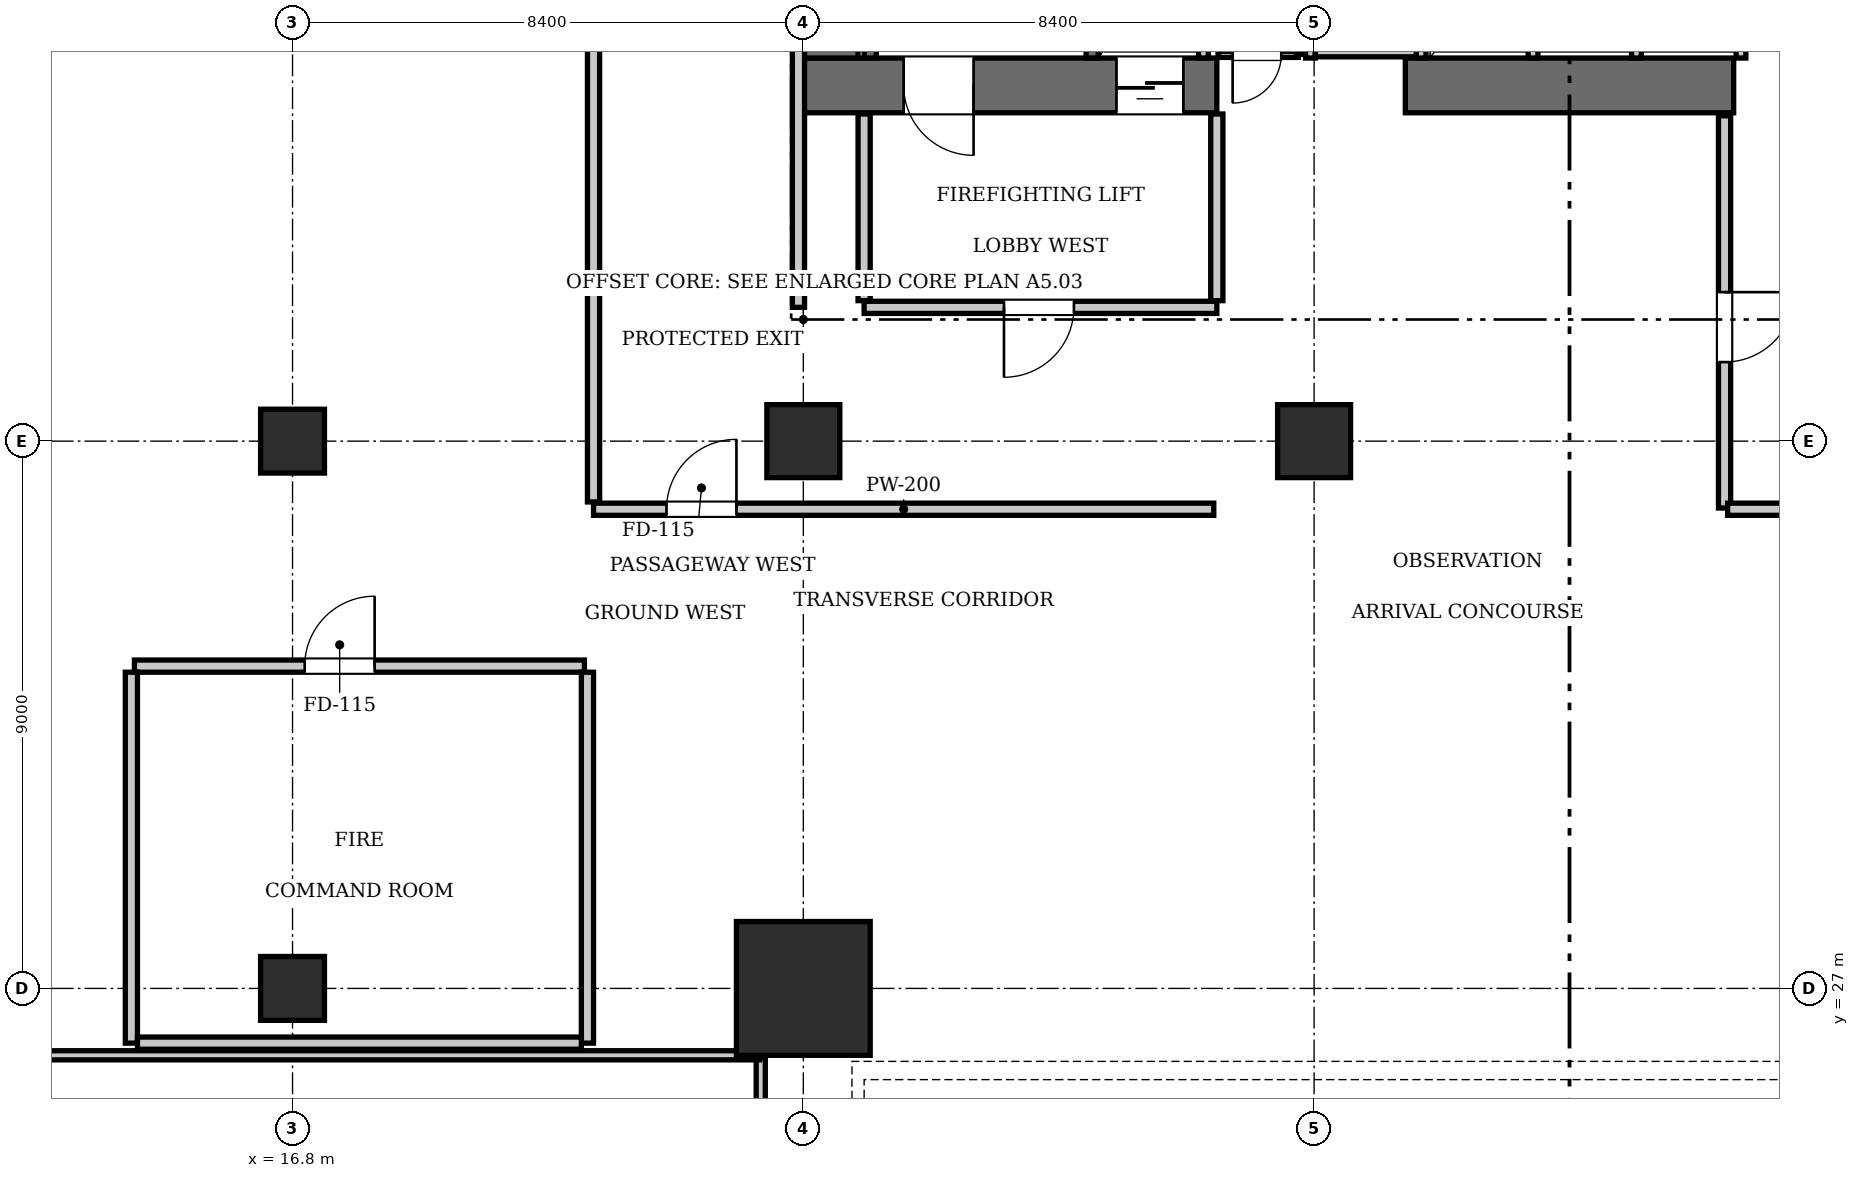
"""IFC4 building model, lengths in metres.
Left out: names, types, materials, properties, quantities, classifications, styles, units other than length and angle.
Written with IfcOpenShell. Run it as: python <this file> out.ifc"""

import sys

from ifc_helpers import new_model, si_unit, direction, frame, frame_2d, origin, origin_2d, place, context, subcontext, project, spatial, rectangle, extrude, element, fill, save


model = new_model("IFC4")
c1 = context("Model", 3, precision=1e-05, world=origin(), true_north=direction((0.0, 1.0)))
c2 = subcontext(c1, "Body", "Model", "MODEL_VIEW")
j1 = project(units=[si_unit("LENGTHUNIT", "METRE"), si_unit("PLANEANGLEUNIT", "RADIAN")], contexts=[c1])
p1 = place(None, origin())
s1 = spatial("IfcSite", under=j1, at=p1, CompositionType="ELEMENT")
p2 = place(p1, origin())
s2 = spatial("IfcBuilding", under=s1, at=p2, CompositionType="ELEMENT")
p3 = place(p2, origin())
s3 = spatial("IfcBuildingStorey", under=s2, at=p3, CompositionType="ELEMENT", Elevation=0.0)
p4 = place(p3, frame((25.2, 27.0, 0.0), z_axis=(0.0, 0.0, 1.0), x_axis=(1.0, 0.0, 0.0)))
e1 = element("IfcColumn", 1, at=p4, inside=s3, PredefinedType="COLUMN", context=c2, shape_type="SweptSolid", body=[
    extrude(rectangle(XDim=2.2, YDim=2.2, at=origin_2d()), origin(), (0.0, 0.0, 1.0), 5.6),
])
p5 = place(p3, frame((25.2, 41.85, 0.0), z_axis=(0.0, 0.0, 1.0), x_axis=(1.0, 0.0, 0.0)))
e2 = element("IfcWall", 2, at=p5, inside=s3, PredefinedType="SHEAR", context=c2, shape_type="SweptSolid", body=[
    extrude(rectangle(XDim=6.8, YDim=0.9, at=frame_2d((3.4, 0.0))), origin(), (0.0, 0.0, 1.0), 5.6),
])
p6 = place(p5, frame((1.65, 0.0, 0.0)))
e3 = element("IfcOpeningElement", 3, at=p6, cuts=e2, PredefinedType="OPENING", context=c2, shape_type="SweptSolid", body=[
    extrude(rectangle(XDim=1.15, YDim=2.15, at=frame_2d((0.575, 1.075))), frame((0.0, 0.46, 0.0), z_axis=(0.0, -1.0, 0.0), x_axis=(1.0, 0.0, 0.0)), (0.0, 0.0, 1.0), 0.92),
])
p7 = place(p5, frame((5.15, 0.0, 0.0)))
e4 = element("IfcOpeningElement", 4, at=p7, cuts=e2, PredefinedType="OPENING", context=c2, shape_type="SweptSolid", body=[
    extrude(rectangle(XDim=1.1, YDim=2.2, at=frame_2d((0.55, 1.1))), frame((0.0, 0.46, 0.0), z_axis=(0.0, -1.0, 0.0), x_axis=(1.0, 0.0, 0.0)), (0.0, 0.0, 1.0), 0.92),
])
p8 = place(p3, frame((35.1, 41.85, 0.0), z_axis=(0.0, 0.0, 1.0), x_axis=(1.0, 0.0, 0.0)))
e5 = element("IfcWall", 5, at=p8, inside=s3, PredefinedType="SHEAR", context=c2, shape_type="SweptSolid", body=[
    extrude(rectangle(XDim=5.4, YDim=0.9, at=frame_2d((2.7, 0.0))), origin(), (0.0, 0.0, 1.0), 5.6),
])
p9 = place(p3, frame((25.65, 42.3, 0.0), z_axis=(0.0, 0.0, 1.0), x_axis=(0.0, 1.0, 0.0)))
e6 = element("IfcWall", 6, at=p9, inside=s3, PredefinedType="SHEAR", context=c2, shape_type="SweptSolid", body=[
    extrude(rectangle(XDim=1.6, YDim=0.9, at=frame_2d((0.8, 0.0))), origin(), (0.0, 0.0, 1.0), 5.6),
])
for number, where, z_axis, x_axis in (
    (7, (25.2, 36.0, 0.0), (0.0, 0.0, 1.0), (1.0, 0.0, 0.0)),
    (8, (33.6, 36.0, 0.0), (0.0, 0.0, 1.0), (1.0, 0.0, 0.0)),
):
    element("IfcColumn", number, at=place(p3, frame(where, z_axis=z_axis, x_axis=x_axis)), inside=s3, PredefinedType="COLUMN", context=c2, shape_type="SweptSolid", body=[
        extrude(rectangle(XDim=1.2, YDim=1.2, at=origin_2d()), origin(), (0.0, 0.0, 1.0), 5.6),
    ])
for number, where, z_axis, x_axis in (
    (9, (16.8, 27.0, 0.0), (0.0, 0.0, 1.0), (1.0, 0.0, 0.0)),
    (10, (16.8, 36.0, 0.0), (0.0, 0.0, 1.0), (1.0, 0.0, 0.0)),
):
    element("IfcColumn", number, at=place(p3, frame(where, z_axis=z_axis, x_axis=x_axis)), inside=s3, PredefinedType="COLUMN", context=c2, shape_type="SweptSolid", body=[
        extrude(rectangle(XDim=1.05, YDim=1.05, at=origin_2d()), origin(), (0.0, 0.0, 1.0), 5.6),
    ])
p10 = place(p3, frame((29.95, 42.3, 0.0), z_axis=(0.0, 0.0, 1.0), x_axis=(0.0, 1.0, 0.0)))
e11 = element("IfcWall", 11, at=p10, inside=s3, PredefinedType="SOLIDWALL", context=c2, shape_type="SweptSolid", body=[
    extrude(rectangle(XDim=8.85, YDim=0.2, at=frame_2d((4.425, 0.0))), origin(), (0.0, 0.0, 1.0), 5.32),
])
p11 = place(p3, frame((26.3, 42.3, 0.0), z_axis=(0.0, 0.0, 1.0), x_axis=(0.0, 1.0, 0.0)))
e12 = element("IfcWall", 12, at=p11, inside=s3, PredefinedType="SOLIDWALL", context=c2, shape_type="SweptSolid", body=[
    extrude(rectangle(XDim=1.58, YDim=0.2, at=frame_2d((0.79, 0.0))), origin(), (0.0, 0.0, 1.0), 5.32),
])
p12 = place(p3, frame((31.78, 42.3, 0.0), z_axis=(0.0, 0.0, 1.0), x_axis=(0.0, 1.0, 0.0)))
e13 = element("IfcWall", 13, at=p12, inside=s3, PredefinedType="SOLIDWALL", context=c2, shape_type="SweptSolid", body=[
    extrude(rectangle(XDim=2.44, YDim=0.16, at=frame_2d((1.22, 0.0))), origin(), (0.0, 0.0, 1.0), 5.32),
])
for number, where, z_axis, x_axis in (
    (14, (37.2, 42.3, 0.0), (0.0, 0.0, 1.0), (0.0, 1.0, 0.0)),
    (15, (38.9, 42.3, 0.0), (0.0, 0.0, 1.0), (0.0, 1.0, 0.0)),
    (16, (40.62, 42.3, 0.0), (0.0, 0.0, 1.0), (0.0, 1.0, 0.0)),
):
    element("IfcWall", number, at=place(p3, frame(where, z_axis=z_axis, x_axis=x_axis)), inside=s3, PredefinedType="SOLIDWALL", context=c2, shape_type="SweptSolid", body=[
        extrude(rectangle(XDim=2.05, YDim=0.16, at=frame_2d((1.025, 0.0))), origin(), (0.0, 0.0, 1.0), 5.32),
    ])
for number, where, z_axis, x_axis in (
    (17, (33.54, 42.3, 0.0), (0.0, 0.0, 1.0), (0.0, 1.0, 0.0)),
    (18, (35.36, 42.3, 0.0), (0.0, 0.0, 1.0), (0.0, 1.0, 0.0)),
):
    element("IfcWall", number, at=place(p3, frame(where, z_axis=z_axis, x_axis=x_axis)), inside=s3, PredefinedType="SOLIDWALL", context=c2, shape_type="SweptSolid", body=[
        extrude(rectangle(XDim=2.1, YDim=0.16, at=frame_2d((1.05, 0.0))), origin(), (0.0, 0.0, 1.0), 5.32),
    ])
p13 = place(p3, frame((33.62, 42.4, 0.0), z_axis=(0.0, 0.0, 1.0), x_axis=(1.0, 0.0, 0.0)))
e19 = element("IfcWall", 19, at=p13, inside=s3, PredefinedType="SOLIDWALL", context=c2, shape_type="SweptSolid", body=[
    extrude(rectangle(XDim=1.66, YDim=0.16, at=frame_2d((0.83, 0.0))), origin(), (0.0, 0.0, 1.0), 5.32),
])
p14 = place(p3, frame((26.2, 38.2, 0.0), z_axis=(0.0, 0.0, 1.0), x_axis=(1.0, 0.0, 0.0)))
e20 = element("IfcWall", 20, at=p14, inside=s3, PredefinedType="PARTITIONING", context=c2, shape_type="SweptSolid", body=[
    extrude(rectangle(XDim=5.8, YDim=0.2, at=frame_2d((2.9, 0.0))), origin(), (0.0, 0.0, 1.0), 5.32),
])
p15 = place(p14, frame((2.3, 0.0, 0.0)))
e21 = element("IfcOpeningElement", 21, at=p15, cuts=e20, PredefinedType="OPENING", context=c2, shape_type="SweptSolid", body=[
    extrude(rectangle(XDim=1.15, YDim=2.15, at=frame_2d((0.575, 1.075))), frame((0.0, 0.11, 0.0), z_axis=(0.0, -1.0, 0.0), x_axis=(1.0, 0.0, 0.0)), (0.0, 0.0, 1.0), 0.22),
])
for number, where, z_axis, x_axis in (
    (22, (26.2, 38.31, 0.0), (0.0, 0.0, 1.0), (0.0, 1.0, 0.0)),
    (23, (32.0, 38.31, 0.0), (0.0, 0.0, 1.0), (0.0, 1.0, 0.0)),
):
    element("IfcWall", number, at=place(p3, frame(where, z_axis=z_axis, x_axis=x_axis)), inside=s3, PredefinedType="PARTITIONING", context=c2, shape_type="SweptSolid", body=[
        extrude(rectangle(XDim=3.07, YDim=0.2, at=frame_2d((1.535, 0.0))), origin(), (0.0, 0.0, 1.0), 5.32),
    ])
p16 = place(p3, frame((32.02, 42.36, 0.0), z_axis=(0.0, 0.0, 1.0), x_axis=(1.0, 0.0, 0.0)))
e24 = element("IfcWall", 24, at=p16, inside=s3, PredefinedType="PARTITIONING", context=c2, shape_type="SweptSolid", body=[
    extrude(rectangle(XDim=1.32, YDim=0.1, at=frame_2d((0.66, 0.0))), origin(), (0.0, 0.0, 1.0), 5.32),
])
p17 = place(p16, frame((0.24, 0.0, 0.0)))
e25 = element("IfcOpeningElement", 25, at=p17, cuts=e24, PredefinedType="OPENING", context=c2, shape_type="SweptSolid", body=[
    extrude(rectangle(XDim=0.8, YDim=2.05, at=frame_2d((0.4, 1.025))), frame((0.0, 0.06, 0.0), z_axis=(0.0, -1.0, 0.0), x_axis=(1.0, 0.0, 0.0)), (0.0, 0.0, 1.0), 0.12),
])
p18 = place(p3, frame((33.36, 42.36, 0.0), z_axis=(0.0, 0.0, 1.0), x_axis=(0.0, 1.0, 0.0)))
e26 = element("IfcWall", 26, at=p18, inside=s3, PredefinedType="PARTITIONING", context=c2, shape_type="SweptSolid", body=[
    extrude(rectangle(XDim=2.58, YDim=0.1, at=frame_2d((1.29, 0.0))), origin(), (0.0, 0.0, 1.0), 5.32),
])
p19 = place(p3, frame((21.75, 34.88, 0.0), z_axis=(0.0, 0.0, 1.0), x_axis=(1.0, 0.0, 0.0)))
e27 = element("IfcWall", 27, at=p19, inside=s3, PredefinedType="PARTITIONING", context=c2, shape_type="SweptSolid", body=[
    extrude(rectangle(XDim=10.2, YDim=0.2, at=frame_2d((5.1, 0.0))), origin(), (0.0, 0.0, 1.0), 5.32),
])
p20 = place(p19, frame((1.2, 0.0, 0.0)))
e28 = element("IfcOpeningElement", 28, at=p20, cuts=e27, PredefinedType="OPENING", context=c2, shape_type="SweptSolid", body=[
    extrude(rectangle(XDim=1.15, YDim=2.15, at=frame_2d((0.575, 1.075))), frame((0.0, 0.11, 0.0), z_axis=(0.0, -1.0, 0.0), x_axis=(1.0, 0.0, 0.0)), (0.0, 0.0, 1.0), 0.22),
])
p21 = place(p3, frame((21.75, 35.0, 0.0), z_axis=(0.0, 0.0, 1.0), x_axis=(0.0, 1.0, 0.0)))
e29 = element("IfcWall", 29, at=p21, inside=s3, PredefinedType="PARTITIONING", context=c2, shape_type="SweptSolid", body=[
    extrude(rectangle(XDim=18.7, YDim=0.2, at=frame_2d((9.35, 0.0))), origin(), (0.0, 0.0, 1.0), 5.32),
])
p22 = place(p3, frame((25.12, 38.2, 0.0), z_axis=(0.0, 0.0, 1.0), x_axis=(0.0, 1.0, 0.0)))
e30 = element("IfcWall", 30, at=p22, inside=s3, PredefinedType="PARTITIONING", context=c2, shape_type="SweptSolid", body=[
    extrude(rectangle(XDim=15.5, YDim=0.2, at=frame_2d((7.75, 0.0))), origin(), (0.0, 0.0, 1.0), 4.685),
])
p23 = place(p3, frame((14.2, 32.3, 0.0), z_axis=(0.0, 0.0, 1.0), x_axis=(1.0, 0.0, 0.0)))
e31 = element("IfcWall", 31, at=p23, inside=s3, PredefinedType="PARTITIONING", context=c2, shape_type="SweptSolid", body=[
    extrude(rectangle(XDim=7.4, YDim=0.2, at=frame_2d((3.7, 0.0))), origin(), (0.0, 0.0, 1.0), 5.32),
])
p24 = place(p23, frame((2.8, 0.0, 0.0)))
e32 = element("IfcOpeningElement", 32, at=p24, cuts=e31, PredefinedType="OPENING", context=c2, shape_type="SweptSolid", body=[
    extrude(rectangle(XDim=1.15, YDim=2.15, at=frame_2d((0.575, 1.075))), frame((0.0, 0.11, 0.0), z_axis=(0.0, -1.0, 0.0), x_axis=(1.0, 0.0, 0.0)), (0.0, 0.0, 1.0), 0.22),
])
for number, where, z_axis, x_axis in (
    (33, (14.15, 26.1, 0.0), (0.0, 0.0, 1.0), (0.0, 1.0, 0.0)),
    (34, (21.65, 26.1, 0.0), (0.0, 0.0, 1.0), (0.0, 1.0, 0.0)),
):
    element("IfcWall", number, at=place(p3, frame(where, z_axis=z_axis, x_axis=x_axis)), inside=s3, PredefinedType="PARTITIONING", context=c2, shape_type="SweptSolid", body=[
        extrude(rectangle(XDim=6.1, YDim=0.2, at=frame_2d((3.05, 0.0))), origin(), (0.0, 0.0, 1.0), 5.32),
    ])
p25 = place(p3, frame((14.25, 26.1, 0.0), z_axis=(0.0, 0.0, 1.0), x_axis=(1.0, 0.0, 0.0)))
e35 = element("IfcWall", 35, at=p25, inside=s3, PredefinedType="PARTITIONING", context=c2, shape_type="SweptSolid", body=[
    extrude(rectangle(XDim=7.3, YDim=0.2, at=frame_2d((3.65, 0.0))), origin(), (0.0, 0.0, 1.0), 5.32),
])
p26 = place(p3, frame((40.35, 34.9, 0.0), z_axis=(0.0, 0.0, 1.0), x_axis=(0.0, 1.0, 0.0)))
e36 = element("IfcWall", 36, at=p26, inside=s3, PredefinedType="PARTITIONING", context=c2, shape_type="SweptSolid", body=[
    extrude(rectangle(XDim=6.45, YDim=0.2, at=frame_2d((3.225, 0.0))), origin(), (0.0, 0.0, 1.0), 5.32),
])
p27 = place(p26, frame((2.4, 0.0, 0.0)))
e37 = element("IfcOpeningElement", 37, at=p27, cuts=e36, PredefinedType="OPENING", context=c2, shape_type="SweptSolid", body=[
    extrude(rectangle(XDim=1.15, YDim=2.15, at=frame_2d((0.575, 1.075))), frame((0.0, 0.11, 0.0), z_axis=(0.0, -1.0, 0.0), x_axis=(1.0, 0.0, 0.0)), (0.0, 0.0, 1.0), 0.22),
])
p28 = place(p3, frame((40.4, 34.88, 0.0), z_axis=(0.0, 0.0, 1.0), x_axis=(1.0, 0.0, 0.0)))
e38 = element("IfcWall", 38, at=p28, inside=s3, PredefinedType="PARTITIONING", context=c2, shape_type="SweptSolid", body=[
    extrude(rectangle(XDim=3.15, YDim=0.2, at=frame_2d((1.575, 0.0))), origin(), (0.0, 0.0, 1.0), 5.32),
])
p29 = place(p3, frame((24.5, 0.14, 0.0), z_axis=(0.0, 0.0, 1.0), x_axis=(0.0, 1.0, 0.0)))
e39 = element("IfcWall", 39, at=p29, inside=s3, PredefinedType="PARTITIONING", context=c2, shape_type="SweptSolid", body=[
    extrude(rectangle(XDim=25.72, YDim=0.15, at=frame_2d((12.86, 0.0))), origin(), (0.0, 0.0, 1.0), 5.32),
])
p30 = place(p29, frame((10.5, 0.0, 0.0)))
e40 = element("IfcOpeningElement", 40, at=p30, cuts=e39, PredefinedType="OPENING", context=c2, shape_type="SweptSolid", body=[
    extrude(rectangle(XDim=1.4, YDim=2.2, at=frame_2d((0.7, 1.1))), frame((0.0, 0.085, 0.0), z_axis=(0.0, -1.0, 0.0), x_axis=(1.0, 0.0, 0.0)), (0.0, 0.0, 1.0), 0.17),
])
p31 = place(p3, frame((0.14, 25.9, 0.0), z_axis=(0.0, 0.0, 1.0), x_axis=(1.0, 0.0, 0.0)))
e41 = element("IfcWall", 41, at=p31, inside=s3, PredefinedType="PARTITIONING", context=c2, shape_type="SweptSolid", body=[
    extrude(rectangle(XDim=24.34, YDim=0.15, at=frame_2d((12.17, 0.0))), origin(), (0.0, 0.0, 1.0), 5.32),
])
p32 = place(p6, frame((1.15, 0.0, 0.0), z_axis=(0.0, 0.0, 1.0), x_axis=(-1.0, 0.0, 0.0)))
e42 = element("IfcDoor", 42, at=p32, inside=s3, OperationType="SINGLE_SWING_LEFT", PredefinedType="DOOR", context=c2, shape_type="SweptSolid", body=[
    extrude(rectangle(XDim=1.15, YDim=2.15, at=frame_2d((0.575, 1.075))), frame((0.0, 0.025, 0.0), z_axis=(0.0, -1.0, 0.0), x_axis=(1.0, 0.0, 0.0)), (0.0, 0.0, 1.0), 0.05),
])
fill(e3, e42)
p33 = place(p7, frame((1.1, 0.0, 0.0), z_axis=(0.0, 0.0, 1.0), x_axis=(-1.0, 0.0, 0.0)))
e43 = element("IfcDoor", 43, at=p33, inside=s3, OperationType="SLIDING_TO_LEFT", PredefinedType="DOOR", context=c2, shape_type="SweptSolid", body=[
    extrude(rectangle(XDim=1.1, YDim=2.2, at=frame_2d((0.55, 1.1))), frame((0.0, 0.025, 0.0), z_axis=(0.0, -1.0, 0.0), x_axis=(1.0, 0.0, 0.0)), (0.0, 0.0, 1.0), 0.05),
])
fill(e4, e43)
p34 = place(p15, frame((1.15, 0.0, 0.0), z_axis=(0.0, 0.0, 1.0), x_axis=(-1.0, 0.0, 0.0)))
e44 = element("IfcDoor", 44, at=p34, inside=s3, OperationType="SINGLE_SWING_RIGHT", PredefinedType="DOOR", context=c2, shape_type="SweptSolid", body=[
    extrude(rectangle(XDim=1.15, YDim=2.15, at=frame_2d((0.575, 1.075))), frame((0.0, 0.025, 0.0), z_axis=(0.0, -1.0, 0.0), x_axis=(1.0, 0.0, 0.0)), (0.0, 0.0, 1.0), 0.05),
])
fill(e21, e44)
p35 = place(p17, frame((0.8, 0.0, 0.0), z_axis=(0.0, 0.0, 1.0), x_axis=(-1.0, 0.0, 0.0)))
e45 = element("IfcDoor", 45, at=p35, inside=s3, OperationType="SINGLE_SWING_RIGHT", PredefinedType="DOOR", context=c2, shape_type="SweptSolid", body=[
    extrude(rectangle(XDim=0.8, YDim=2.05, at=frame_2d((0.4, 1.025))), frame((0.0, 0.025, 0.0), z_axis=(0.0, -1.0, 0.0), x_axis=(1.0, 0.0, 0.0)), (0.0, 0.0, 1.0), 0.05),
])
fill(e25, e45)
p36 = place(p20, origin())
e46 = element("IfcDoor", 46, at=p36, inside=s3, OperationType="SINGLE_SWING_RIGHT", PredefinedType="DOOR", context=c2, shape_type="SweptSolid", body=[
    extrude(rectangle(XDim=1.15, YDim=2.15, at=frame_2d((0.575, 1.075))), frame((0.0, 0.025, 0.0), z_axis=(0.0, -1.0, 0.0), x_axis=(1.0, 0.0, 0.0)), (0.0, 0.0, 1.0), 0.05),
])
fill(e28, e46)
p37 = place(p24, origin())
e47 = element("IfcDoor", 47, at=p37, inside=s3, OperationType="SINGLE_SWING_RIGHT", PredefinedType="DOOR", context=c2, shape_type="SweptSolid", body=[
    extrude(rectangle(XDim=1.15, YDim=2.15, at=frame_2d((0.575, 1.075))), frame((0.0, 0.025, 0.0), z_axis=(0.0, -1.0, 0.0), x_axis=(1.0, 0.0, 0.0)), (0.0, 0.0, 1.0), 0.05),
])
fill(e32, e47)
p38 = place(p27, frame((1.15, 0.0, 0.0), z_axis=(0.0, 0.0, 1.0), x_axis=(-1.0, 0.0, 0.0)))
e48 = element("IfcDoor", 48, at=p38, inside=s3, OperationType="SINGLE_SWING_LEFT", PredefinedType="DOOR", context=c2, shape_type="SweptSolid", body=[
    extrude(rectangle(XDim=1.15, YDim=2.15, at=frame_2d((0.575, 1.075))), frame((0.0, 0.025, 0.0), z_axis=(0.0, -1.0, 0.0), x_axis=(1.0, 0.0, 0.0)), (0.0, 0.0, 1.0), 0.05),
])
fill(e37, e48)
save(model, sys.argv[1])
